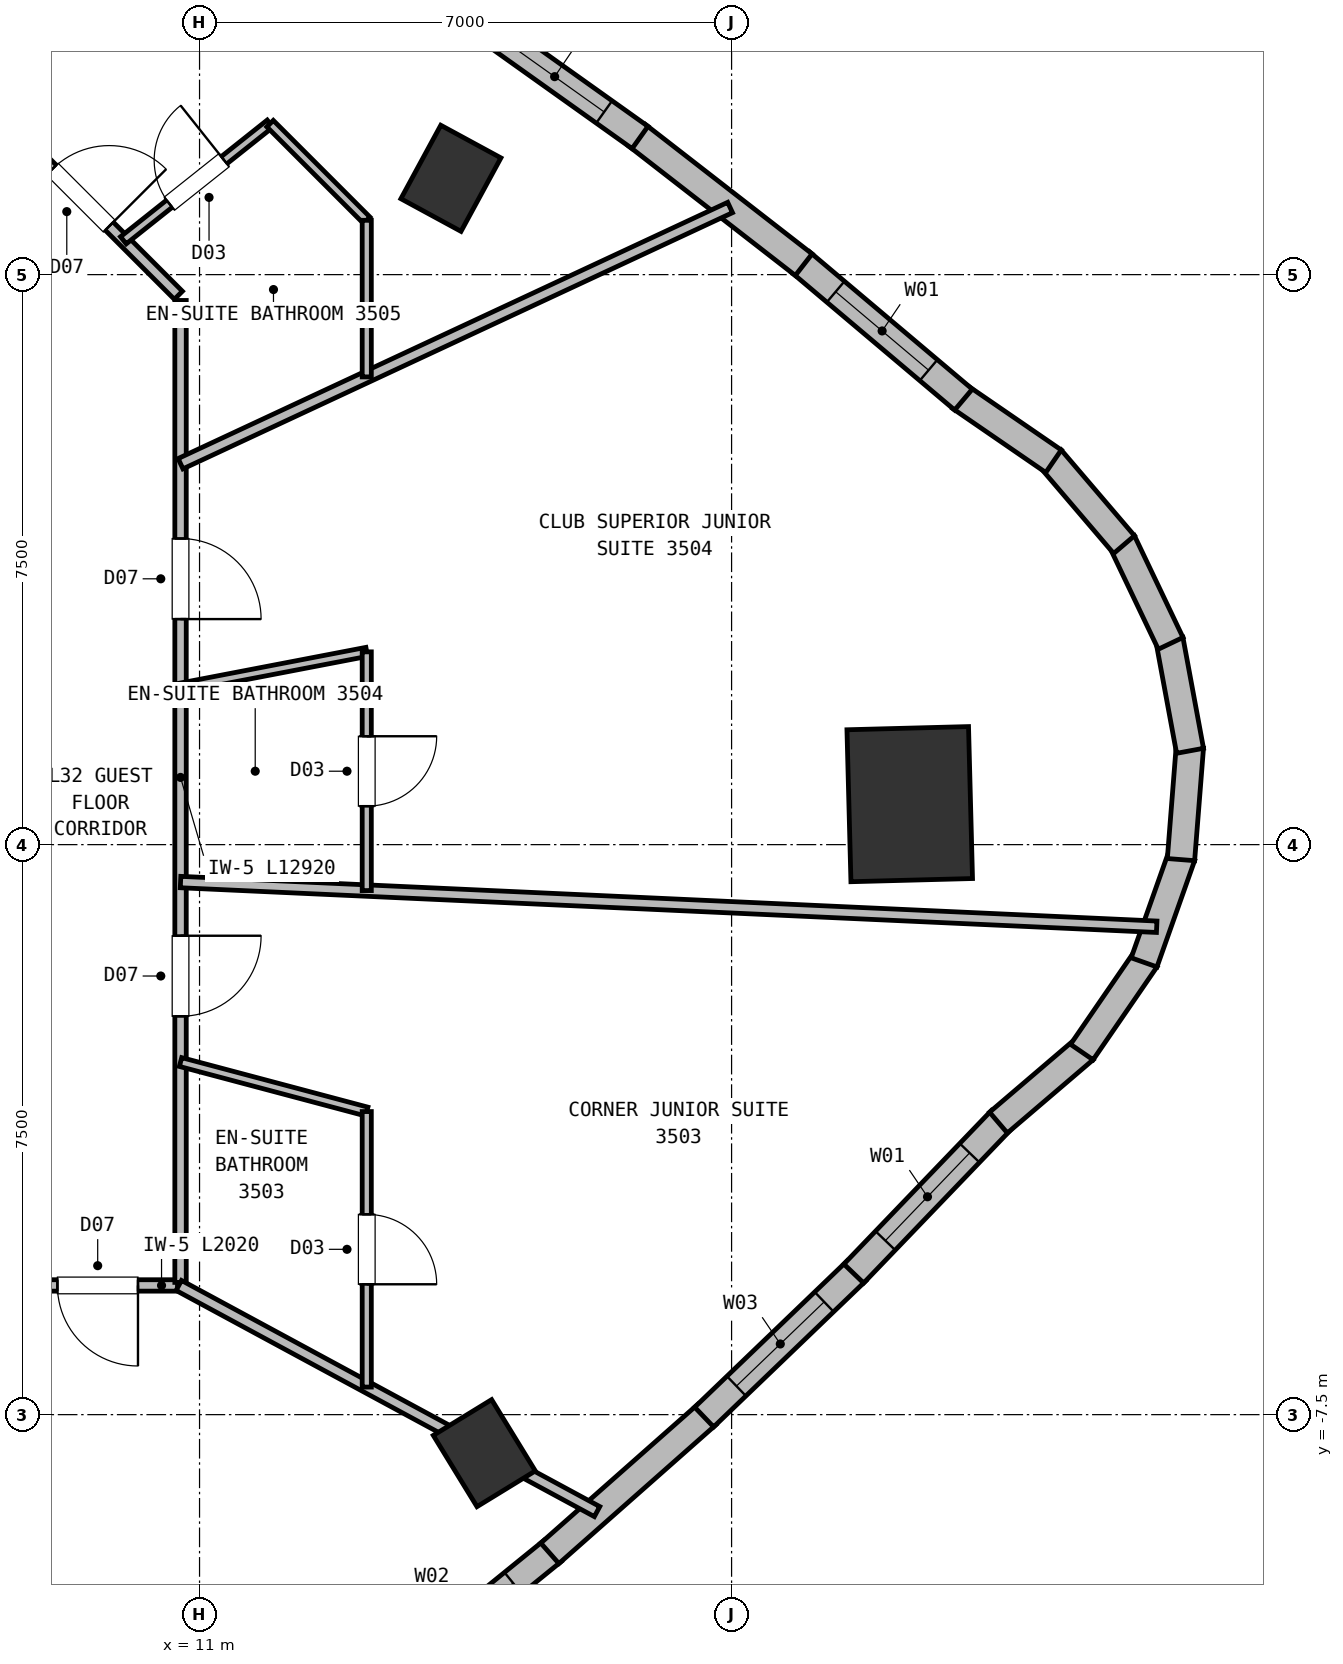
"""IFC4 building model, lengths in metres.
Left out: names, types, materials, properties, quantities, classifications, styles, units other than length and angle.
Written with IfcOpenShell. Run it as: python <this file> out.ifc"""

import sys

from ifc_helpers import new_model, si_unit, direction, frame, frame_2d, origin, origin_2d, place, context, subcontext, project, spatial, rectangle, extrude, element, fill, save


model = new_model("IFC4")
c1 = context("Model", 3, precision=1e-05, world=origin(), true_north=direction((0.0, 1.0)))
c2 = subcontext(c1, "Body", "Model", "MODEL_VIEW")
j1 = project(units=[si_unit("LENGTHUNIT", "METRE"), si_unit("PLANEANGLEUNIT", "RADIAN")], contexts=[c1])
p1 = place(None, origin())
s1 = spatial("IfcSite", under=j1, at=p1, CompositionType="ELEMENT")
p2 = place(p1, origin())
s2 = spatial("IfcBuilding", under=s1, at=p2, CompositionType="ELEMENT")
p3 = place(p2, frame((0.0, 0.0, 131.0)))
s3 = spatial("IfcBuildingStorey", under=s2, at=p3, CompositionType="ELEMENT", Elevation=131.0)
p4 = place(p3, frame((14.747, -8.007, 0.0), z_axis=(0.0, 0.0, 1.0), x_axis=(0.852640164354, 0.522498564716, 0.0)))
e1 = element("IfcColumn", 1, at=p4, inside=s3, PredefinedType="COLUMN", context=c2, shape_type="SweptSolid", body=[
    extrude(rectangle(XDim=0.9, YDim=1.1, at=origin_2d()), origin(), (0.0, 0.0, 1.0), 3.75),
])
p5 = place(p3, frame((20.344, 0.533, 0.0), z_axis=(0.0, 0.0, 1.0), x_axis=(0.999657324976, 0.026176948308, 0.0)))
e2 = element("IfcColumn", 2, at=p5, inside=s3, PredefinedType="COLUMN", context=c2, shape_type="SweptSolid", body=[
    extrude(rectangle(XDim=1.6, YDim=2.0, at=origin_2d()), origin(), (0.0, 0.0, 1.0), 3.75),
])
p6 = place(p3, frame((14.307, 8.767, 0.0), z_axis=(0.0, 0.0, 1.0), x_axis=(-0.878817112662, 0.47715876026, 0.0)))
e3 = element("IfcColumn", 3, at=p6, inside=s3, PredefinedType="COLUMN", context=c2, shape_type="SweptSolid", body=[
    extrude(rectangle(XDim=0.9, YDim=1.1, at=origin_2d()), origin(), (0.0, 0.0, 1.0), 3.75),
])
p7 = place(p3, frame((15.647, -9.292, 0.0), z_axis=(0.0, 0.0, 1.0), x_axis=(-0.776448630517, -0.630180548866, 0.0)))
e4 = element("IfcWall", 4, at=p7, inside=s3, PredefinedType="SOLIDWALL", context=c2, shape_type="SweptSolid", body=[
    extrude(rectangle(XDim=2.744, YDim=0.36, at=frame_2d((1.372, 0.0))), origin(), (0.0, 0.0, 1.0), 3.5),
])
p8 = place(p7, frame((0.672, 0.0, 0.72)))
e5 = element("IfcOpeningElement", 5, at=p8, cuts=e4, PredefinedType="OPENING", context=c2, shape_type="SweptSolid", body=[
    extrude(rectangle(XDim=1.4, YDim=1.84, at=frame_2d((0.7, 0.92))), frame((0.0, 0.19, 0.0), z_axis=(0.0, -1.0, 0.0), x_axis=(1.0, 0.0, 0.0)), (0.0, 0.0, 1.0), 0.38),
])
p9 = place(p3, frame((17.676, -7.498, 0.0), z_axis=(0.0, 0.0, 1.0), x_axis=(-0.749310700852, -0.662218599549, 0.0)))
e6 = element("IfcWall", 6, at=p9, inside=s3, PredefinedType="SOLIDWALL", context=c2, shape_type="SweptSolid", body=[
    extrude(rectangle(XDim=2.758, YDim=0.36, at=frame_2d((1.379, 0.0))), origin(), (0.0, 0.0, 1.0), 3.5),
])
p10 = place(p3, frame((19.643, -5.608, 0.0), z_axis=(0.0, 0.0, 1.0), x_axis=(-0.721375025509, -0.692544635797, 0.0)))
e7 = element("IfcWall", 7, at=p10, inside=s3, PredefinedType="SOLIDWALL", context=c2, shape_type="SweptSolid", body=[
    extrude(rectangle(XDim=2.778, YDim=0.36, at=frame_2d((1.389, 0.0))), origin(), (0.0, 0.0, 1.0), 3.5),
])
p11 = place(p10, frame((0.589, 0.0, 0.72)))
e8 = element("IfcOpeningElement", 8, at=p11, cuts=e7, PredefinedType="OPENING", context=c2, shape_type="SweptSolid", body=[
    extrude(rectangle(XDim=1.6, YDim=1.88, at=frame_2d((0.8, 0.94))), frame((0.0, 0.19, 0.0), z_axis=(0.0, -1.0, 0.0), x_axis=(1.0, 0.0, 0.0)), (0.0, 0.0, 1.0), 0.38),
])
p12 = place(p3, frame((21.548, -3.623, 0.0), z_axis=(0.0, 0.0, 1.0), x_axis=(-0.692624348053, -0.72129849056, 0.0)))
e9 = element("IfcWall", 9, at=p12, inside=s3, PredefinedType="SOLIDWALL", context=c2, shape_type="SweptSolid", body=[
    extrude(rectangle(XDim=2.801, YDim=0.36, at=frame_2d((1.401, 0.0))), origin(), (0.0, 0.0, 1.0), 3.5),
])
p13 = place(p12, frame((0.601, 0.0, 0.72)))
e10 = element("IfcOpeningElement", 10, at=p13, cuts=e9, PredefinedType="OPENING", context=c2, shape_type="SweptSolid", body=[
    extrude(rectangle(XDim=1.6, YDim=1.88, at=frame_2d((0.8, 0.94))), frame((0.0, 0.19, 0.0), z_axis=(0.0, -1.0, 0.0), x_axis=(1.0, 0.0, 0.0)), (0.0, 0.0, 1.0), 0.38),
])
p14 = place(p3, frame((22.641, -2.693, 0.0), z_axis=(0.0, 0.0, 1.0), x_axis=(-0.760392276745, -0.649464075578, 0.0)))
e11 = element("IfcWall", 11, at=p14, inside=s3, PredefinedType="SOLIDWALL", context=c2, shape_type="SweptSolid", body=[
    extrude(rectangle(XDim=1.486, YDim=0.36, at=frame_2d((0.743, 0.0))), origin(), (0.0, 0.0, 1.0), 3.5),
])
for number, where, z_axis, x_axis in (
    (12, (23.45, -1.505, 0.0), (0.0, 0.0, 1.0), (-0.566, -0.824, 0.0)),
    (13, (23.923, -0.148, 0.0), (0.0, 0.0, 1.0), (-0.334, -0.943, 0.0)),
):
    element("IfcWall", number, at=place(p3, frame(where, z_axis=z_axis, x_axis=x_axis)), inside=s3, PredefinedType="SOLIDWALL", context=c2, shape_type="SweptSolid", body=[
        extrude(rectangle(XDim=1.486, YDim=0.36, at=frame_2d((0.743, 0.0))), origin(), (0.0, 0.0, 1.0), 3.5),
    ])
for number, where, z_axis, x_axis in (
    (14, (24.029, 1.284, 0.0), (0.0, 0.0, 1.0), (-0.079, -0.997, 0.0)),
    (15, (23.761, 2.696, 0.0), (0.0, 0.0, 1.0), (0.182, -0.983, 0.0)),
    (16, (23.137, 3.99, 0.0), (0.0, 0.0, 1.0), (0.431, -0.903, 0.0)),
):
    element("IfcWall", number, at=place(p3, frame(where, z_axis=z_axis, x_axis=x_axis)), inside=s3, PredefinedType="SOLIDWALL", context=c2, shape_type="SweptSolid", body=[
        extrude(rectangle(XDim=1.486, YDim=0.36, at=frame_2d((0.743, 0.0))), origin(), (0.0, 0.0, 1.0), 3.5),
    ])
for number, where, z_axis, x_axis in (
    (17, (22.199, 5.078, 0.0), (0.0, 0.0, 1.0), (0.649, -0.76, 0.0)),
    (18, (21.011, 5.886, 0.0), (0.0, 0.0, 1.0), (0.824, -0.566, 0.0)),
):
    element("IfcWall", number, at=place(p3, frame(where, z_axis=z_axis, x_axis=x_axis)), inside=s3, PredefinedType="SOLIDWALL", context=c2, shape_type="SweptSolid", body=[
        extrude(rectangle(XDim=1.486, YDim=0.36, at=frame_2d((0.743, 0.0))), origin(), (0.0, 0.0, 1.0), 3.5),
    ])
p15 = place(p3, frame((18.91, 7.662, 0.0), z_axis=(0.0, 0.0, 1.0), x_axis=(0.764205561234, -0.644972759253, 0.0)))
e19 = element("IfcWall", 19, at=p15, inside=s3, PredefinedType="SOLIDWALL", context=c2, shape_type="SweptSolid", body=[
    extrude(rectangle(XDim=2.801, YDim=0.36, at=frame_2d((1.4, 0.0))), origin(), (0.0, 0.0, 1.0), 3.5),
])
p16 = place(p15, frame((0.601, 0.0, 0.72)))
e20 = element("IfcOpeningElement", 20, at=p16, cuts=e19, PredefinedType="OPENING", context=c2, shape_type="SweptSolid", body=[
    extrude(rectangle(XDim=1.6, YDim=1.88, at=frame_2d((0.8, 0.94))), frame((0.0, 0.19, 0.0), z_axis=(0.0, -1.0, 0.0), x_axis=(1.0, 0.0, 0.0)), (0.0, 0.0, 1.0), 0.38),
])
p17 = place(p3, frame((16.755, 9.334, 0.0), z_axis=(0.0, 0.0, 1.0), x_axis=(0.789792196605, -0.61337450728, 0.0)))
e21 = element("IfcWall", 21, at=p17, inside=s3, PredefinedType="SOLIDWALL", context=c2, shape_type="SweptSolid", body=[
    extrude(rectangle(XDim=2.777, YDim=0.36, at=frame_2d((1.389, 0.0))), origin(), (0.0, 0.0, 1.0), 3.5),
])
p18 = place(p3, frame((14.549, 10.905, 0.0), z_axis=(0.0, 0.0, 1.0), x_axis=(0.814510150839, -0.580149303352, 0.0)))
e22 = element("IfcWall", 22, at=p18, inside=s3, PredefinedType="SOLIDWALL", context=c2, shape_type="SweptSolid", body=[
    extrude(rectangle(XDim=2.759, YDim=0.36, at=frame_2d((1.379, 0.0))), origin(), (0.0, 0.0, 1.0), 3.5),
])
p19 = place(p18, frame((0.579, 0.0, 0.72)))
e23 = element("IfcOpeningElement", 23, at=p19, cuts=e22, PredefinedType="OPENING", context=c2, shape_type="SweptSolid", body=[
    extrude(rectangle(XDim=1.6, YDim=1.88, at=frame_2d((0.8, 0.94))), frame((0.0, 0.19, 0.0), z_axis=(0.0, -1.0, 0.0), x_axis=(1.0, 0.0, 0.0)), (0.0, 0.0, 1.0), 0.38),
])
p20 = place(p3, frame((10.71, -5.8, 0.0), z_axis=(0.0, 0.0, 1.0), x_axis=(-1.0, 0.0, 0.0)))
e24 = element("IfcWall", 24, at=p20, inside=s3, PredefinedType="PARTITIONING", context=c2, shape_type="SweptSolid", body=[
    extrude(rectangle(XDim=2.02, YDim=0.15, at=frame_2d((1.01, 0.0))), origin(), (0.0, 0.0, 1.0), 3.5),
])
p21 = place(p20, frame((0.52, 0.0, 0.0)))
e25 = element("IfcOpeningElement", 25, at=p21, cuts=e24, PredefinedType="OPENING", context=c2, shape_type="SweptSolid", body=[
    extrude(rectangle(XDim=1.06, YDim=2.15, at=frame_2d((0.53, 1.075))), frame((0.0, 0.085, 0.0), z_axis=(0.0, -1.0, 0.0), x_axis=(1.0, 0.0, 0.0)), (0.0, 0.0, 1.0), 0.17),
])
p22 = place(p3, frame((10.75, 7.16, 0.0), z_axis=(0.0, 0.0, 1.0), x_axis=(0.0, -1.0, 0.0)))
e26 = element("IfcWall", 26, at=p22, inside=s3, PredefinedType="PARTITIONING", context=c2, shape_type="SweptSolid", body=[
    extrude(rectangle(XDim=12.92, YDim=0.15, at=frame_2d((6.46, 0.0))), origin(), (0.0, 0.0, 1.0), 3.5),
])
p23 = place(p22, frame((8.359, 0.0, 0.0)))
e27 = element("IfcOpeningElement", 27, at=p23, cuts=e26, PredefinedType="OPENING", context=c2, shape_type="SweptSolid", body=[
    extrude(rectangle(XDim=1.06, YDim=2.15, at=frame_2d((0.53, 1.075))), frame((0.0, 0.085, 0.0), z_axis=(0.0, -1.0, 0.0), x_axis=(1.0, 0.0, 0.0)), (0.0, 0.0, 1.0), 0.17),
])
p24 = place(p22, frame((3.132, 0.0, 0.0)))
e28 = element("IfcOpeningElement", 28, at=p24, cuts=e26, PredefinedType="OPENING", context=c2, shape_type="SweptSolid", body=[
    extrude(rectangle(XDim=1.06, YDim=2.15, at=frame_2d((0.53, 1.075))), frame((0.0, 0.085, 0.0), z_axis=(0.0, -1.0, 0.0), x_axis=(1.0, 0.0, 0.0)), (0.0, 0.0, 1.0), 0.17),
])
p25 = place(p3, frame((8.678, 9.272, 0.0), z_axis=(0.0, 0.0, 1.0), x_axis=(0.707106781187, -0.707106781187, 0.0)))
e29 = element("IfcWall", 29, at=p25, inside=s3, PredefinedType="PARTITIONING", context=c2, shape_type="SweptSolid", body=[
    extrude(rectangle(XDim=2.89, YDim=0.15, at=frame_2d((1.445, 0.0))), origin(), (0.0, 0.0, 1.0), 3.5),
])
p26 = place(p25, frame((0.543, 0.0, 0.0)))
e30 = element("IfcOpeningElement", 30, at=p26, cuts=e29, PredefinedType="OPENING", context=c2, shape_type="SweptSolid", body=[
    extrude(rectangle(XDim=1.06, YDim=2.15, at=frame_2d((0.53, 1.075))), frame((0.0, 0.085, 0.0), z_axis=(0.0, -1.0, 0.0), x_axis=(1.0, 0.0, 0.0)), (0.0, 0.0, 1.0), 0.17),
])
p27 = place(p3, frame((10.727, -5.8, 0.0), z_axis=(0.0, 0.0, 1.0), x_axis=(0.879646503143, -0.475628036924, 0.0)))
e31 = element("IfcWall", 31, at=p27, inside=s3, PredefinedType="PARTITIONING", context=c2, shape_type="SweptSolid", body=[
    extrude(rectangle(XDim=6.256, YDim=0.15, at=frame_2d((3.128, 0.0))), origin(), (0.0, 0.0, 1.0), 2.98),
])
p28 = place(p3, frame((10.75, -2.86, 0.0), z_axis=(0.0, 0.0, 1.0), x_axis=(0.966378640851, -0.257123166026, 0.0)))
e32 = element("IfcWall", 32, at=p28, inside=s3, PredefinedType="PARTITIONING", context=c2, shape_type="SweptSolid", body=[
    extrude(rectangle(XDim=2.535, YDim=0.12, at=frame_2d((1.268, 0.0))), origin(), (0.0, 0.0, 1.0), 3.5),
])
p29 = place(p3, frame((13.2, -3.512, 0.0), z_axis=(0.0, 0.0, 1.0), x_axis=(0.0, -1.0, 0.0)))
e33 = element("IfcWall", 33, at=p29, inside=s3, PredefinedType="PARTITIONING", context=c2, shape_type="SweptSolid", body=[
    extrude(rectangle(XDim=3.625, YDim=0.12, at=frame_2d((1.812, 0.0))), origin(), (0.0, 0.0, 1.0), 3.5),
])
p30 = place(p29, frame((1.353, 0.0, 0.0)))
e34 = element("IfcOpeningElement", 34, at=p30, cuts=e33, PredefinedType="OPENING", context=c2, shape_type="SweptSolid", body=[
    extrude(rectangle(XDim=0.92, YDim=2.1, at=frame_2d((0.46, 1.05))), frame((0.0, 0.07, 0.0), z_axis=(0.0, -1.0, 0.0), x_axis=(1.0, 0.0, 0.0)), (0.0, 0.0, 1.0), 0.14),
])
p31 = place(p3, frame((10.75, -0.492, 0.0), z_axis=(0.0, 0.0, 1.0), x_axis=(0.998952227347, -0.045765133883, 0.0)))
e35 = element("IfcWall", 35, at=p31, inside=s3, PredefinedType="PARTITIONING", context=c2, shape_type="SweptSolid", body=[
    extrude(rectangle(XDim=12.856, YDim=0.15, at=frame_2d((6.428, 0.0))), origin(), (0.0, 0.0, 1.0), 3.5),
])
p32 = place(p3, frame((13.2, 2.537, 0.0), z_axis=(0.0, 0.0, 1.0), x_axis=(-0.982039238769, -0.188676796447, 0.0)))
e36 = element("IfcWall", 36, at=p32, inside=s3, PredefinedType="PARTITIONING", context=c2, shape_type="SweptSolid", body=[
    extrude(rectangle(XDim=2.495, YDim=0.12, at=frame_2d((1.248, 0.0))), origin(), (0.0, 0.0, 1.0), 3.5),
])
p33 = place(p3, frame((13.2, 2.537, 0.0), z_axis=(0.0, 0.0, 1.0), x_axis=(0.0, -1.0, 0.0)))
e37 = element("IfcWall", 37, at=p33, inside=s3, PredefinedType="PARTITIONING", context=c2, shape_type="SweptSolid", body=[
    extrude(rectangle(XDim=3.141, YDim=0.12, at=frame_2d((1.571, 0.0))), origin(), (0.0, 0.0, 1.0), 3.5),
])
p34 = place(p33, frame((1.111, 0.0, 0.0)))
e38 = element("IfcOpeningElement", 38, at=p34, cuts=e37, PredefinedType="OPENING", context=c2, shape_type="SweptSolid", body=[
    extrude(rectangle(XDim=0.92, YDim=2.1, at=frame_2d((0.46, 1.05))), frame((0.0, 0.07, 0.0), z_axis=(0.0, -1.0, 0.0), x_axis=(1.0, 0.0, 0.0)), (0.0, 0.0, 1.0), 0.14),
])
p35 = place(p3, frame((10.75, 5.012, 0.0), z_axis=(0.0, 0.0, 1.0), x_axis=(0.90633944919, 0.422550355393, 0.0)))
e39 = element("IfcWall", 39, at=p35, inside=s3, PredefinedType="PARTITIONING", context=c2, shape_type="SweptSolid", body=[
    extrude(rectangle(XDim=7.977, YDim=0.15, at=frame_2d((3.989, 0.0))), origin(), (0.0, 0.0, 1.0), 3.5),
])
p36 = place(p3, frame((9.998, 7.952, 0.0), z_axis=(0.0, 0.0, 1.0), x_axis=(0.782652575374, 0.622458790813, 0.0)))
e40 = element("IfcWall", 40, at=p36, inside=s3, PredefinedType="PARTITIONING", context=c2, shape_type="SweptSolid", body=[
    extrude(rectangle(XDim=2.466, YDim=0.12, at=frame_2d((1.233, 0.0))), origin(), (0.0, 0.0, 1.0), 3.5),
])
p37 = place(p36, frame((0.773, 0.0, 0.0)))
e41 = element("IfcOpeningElement", 41, at=p37, cuts=e40, PredefinedType="OPENING", context=c2, shape_type="SweptSolid", body=[
    extrude(rectangle(XDim=0.92, YDim=2.1, at=frame_2d((0.46, 1.05))), frame((0.0, 0.07, 0.0), z_axis=(0.0, -1.0, 0.0), x_axis=(1.0, 0.0, 0.0)), (0.0, 0.0, 1.0), 0.14),
])
p38 = place(p3, frame((11.928, 9.487, 0.0), z_axis=(0.0, 0.0, 1.0), x_axis=(0.707106781187, -0.707106781187, 0.0)))
e42 = element("IfcWall", 42, at=p38, inside=s3, PredefinedType="PARTITIONING", context=c2, shape_type="SweptSolid", body=[
    extrude(rectangle(XDim=1.799, YDim=0.12, at=frame_2d((0.899, 0.0))), origin(), (0.0, 0.0, 1.0), 3.5),
])
p39 = place(p3, frame((13.2, 6.154, 0.0), z_axis=(0.0, 0.0, 1.0), x_axis=(0.0, 1.0, 0.0)))
e43 = element("IfcWall", 43, at=p39, inside=s3, PredefinedType="PARTITIONING", context=c2, shape_type="SweptSolid", body=[
    extrude(rectangle(XDim=2.061, YDim=0.12, at=frame_2d((1.03, 0.0))), origin(), (0.0, 0.0, 1.0), 3.5),
])
p40 = place(p3, frame((7.04, 9.3, 0.0), z_axis=(0.0, 0.0, 1.0), x_axis=(0.603561778398, 0.797316235667, 0.0)))
e44 = element("IfcWall", 44, at=p40, inside=s3, PredefinedType="PARTITIONING", context=c2, shape_type="SweptSolid", body=[
    extrude(rectangle(XDim=5.354, YDim=0.15, at=frame_2d((2.677, 0.0))), origin(), (0.0, 0.0, 1.0), 3.5),
])
p41 = place(p8, origin())
e45 = element("IfcWindow", 45, at=p41, inside=s3, PartitioningType="SINGLE_PANEL", PredefinedType="WINDOW", context=c2, shape_type="SweptSolid", body=[
    extrude(rectangle(XDim=1.4, YDim=1.84, at=frame_2d((0.7, 0.92))), frame((0.0, 0.03, 0.0), z_axis=(0.0, -1.0, 0.0), x_axis=(1.0, 0.0, 0.0)), (0.0, 0.0, 1.0), 0.06),
])
fill(e5, e45)
p42 = place(p11, origin())
e46 = element("IfcWindow", 46, at=p42, inside=s3, PartitioningType="SINGLE_PANEL", PredefinedType="WINDOW", context=c2, shape_type="SweptSolid", body=[
    extrude(rectangle(XDim=1.6, YDim=1.88, at=frame_2d((0.8, 0.94))), frame((0.0, 0.03, 0.0), z_axis=(0.0, -1.0, 0.0), x_axis=(1.0, 0.0, 0.0)), (0.0, 0.0, 1.0), 0.06),
])
fill(e8, e46)
p43 = place(p13, origin())
e47 = element("IfcWindow", 47, at=p43, inside=s3, PartitioningType="SINGLE_PANEL", PredefinedType="WINDOW", context=c2, shape_type="SweptSolid", body=[
    extrude(rectangle(XDim=1.6, YDim=1.88, at=frame_2d((0.8, 0.94))), frame((0.0, 0.03, 0.0), z_axis=(0.0, -1.0, 0.0), x_axis=(1.0, 0.0, 0.0)), (0.0, 0.0, 1.0), 0.06),
])
fill(e10, e47)
p44 = place(p16, origin())
e48 = element("IfcWindow", 48, at=p44, inside=s3, PartitioningType="SINGLE_PANEL", PredefinedType="WINDOW", context=c2, shape_type="SweptSolid", body=[
    extrude(rectangle(XDim=1.6, YDim=1.88, at=frame_2d((0.8, 0.94))), frame((0.0, 0.03, 0.0), z_axis=(0.0, -1.0, 0.0), x_axis=(1.0, 0.0, 0.0)), (0.0, 0.0, 1.0), 0.06),
])
fill(e20, e48)
p45 = place(p19, origin())
e49 = element("IfcWindow", 49, at=p45, inside=s3, PartitioningType="SINGLE_PANEL", PredefinedType="WINDOW", context=c2, shape_type="SweptSolid", body=[
    extrude(rectangle(XDim=1.6, YDim=1.88, at=frame_2d((0.8, 0.94))), frame((0.0, 0.03, 0.0), z_axis=(0.0, -1.0, 0.0), x_axis=(1.0, 0.0, 0.0)), (0.0, 0.0, 1.0), 0.06),
])
fill(e23, e49)
p46 = place(p30, origin())
e50 = element("IfcDoor", 50, at=p46, inside=s3, OperationType="SINGLE_SWING_RIGHT", PredefinedType="DOOR", context=c2, shape_type="SweptSolid", body=[
    extrude(rectangle(XDim=0.92, YDim=2.1, at=frame_2d((0.46, 1.05))), frame((0.0, 0.025, 0.0), z_axis=(0.0, -1.0, 0.0), x_axis=(1.0, 0.0, 0.0)), (0.0, 0.0, 1.0), 0.05),
])
fill(e34, e50)
p47 = place(p34, origin())
e51 = element("IfcDoor", 51, at=p47, inside=s3, OperationType="SINGLE_SWING_LEFT", PredefinedType="DOOR", context=c2, shape_type="SweptSolid", body=[
    extrude(rectangle(XDim=0.92, YDim=2.1, at=frame_2d((0.46, 1.05))), frame((0.0, 0.025, 0.0), z_axis=(0.0, -1.0, 0.0), x_axis=(1.0, 0.0, 0.0)), (0.0, 0.0, 1.0), 0.05),
])
fill(e38, e51)
p48 = place(p37, origin())
e52 = element("IfcDoor", 52, at=p48, inside=s3, OperationType="SINGLE_SWING_RIGHT", PredefinedType="DOOR", context=c2, shape_type="SweptSolid", body=[
    extrude(rectangle(XDim=0.92, YDim=2.1, at=frame_2d((0.46, 1.05))), frame((0.0, 0.025, 0.0), z_axis=(0.0, -1.0, 0.0), x_axis=(1.0, 0.0, 0.0)), (0.0, 0.0, 1.0), 0.05),
])
fill(e41, e52)
p49 = place(p26, origin())
e53 = element("IfcDoor", 53, at=p49, inside=s3, OperationType="SINGLE_SWING_RIGHT", PredefinedType="DOOR", context=c2, shape_type="SweptSolid", body=[
    extrude(rectangle(XDim=1.06, YDim=2.15, at=frame_2d((0.53, 1.075))), frame((0.0, 0.025, 0.0), z_axis=(0.0, -1.0, 0.0), x_axis=(1.0, 0.0, 0.0)), (0.0, 0.0, 1.0), 0.05),
])
fill(e30, e53)
p50 = place(p23, origin())
e54 = element("IfcDoor", 54, at=p50, inside=s3, OperationType="SINGLE_SWING_LEFT", PredefinedType="DOOR", context=c2, shape_type="SweptSolid", body=[
    extrude(rectangle(XDim=1.06, YDim=2.15, at=frame_2d((0.53, 1.075))), frame((0.0, 0.025, 0.0), z_axis=(0.0, -1.0, 0.0), x_axis=(1.0, 0.0, 0.0)), (0.0, 0.0, 1.0), 0.05),
])
fill(e27, e54)
p51 = place(p24, origin())
e55 = element("IfcDoor", 55, at=p51, inside=s3, OperationType="SINGLE_SWING_RIGHT", PredefinedType="DOOR", context=c2, shape_type="SweptSolid", body=[
    extrude(rectangle(XDim=1.06, YDim=2.15, at=frame_2d((0.53, 1.075))), frame((0.0, 0.025, 0.0), z_axis=(0.0, -1.0, 0.0), x_axis=(1.0, 0.0, 0.0)), (0.0, 0.0, 1.0), 0.05),
])
fill(e28, e55)
p52 = place(p21, origin())
e56 = element("IfcDoor", 56, at=p52, inside=s3, OperationType="SINGLE_SWING_LEFT", PredefinedType="DOOR", context=c2, shape_type="SweptSolid", body=[
    extrude(rectangle(XDim=1.06, YDim=2.15, at=frame_2d((0.53, 1.075))), frame((0.0, 0.025, 0.0), z_axis=(0.0, -1.0, 0.0), x_axis=(1.0, 0.0, 0.0)), (0.0, 0.0, 1.0), 0.05),
])
fill(e25, e56)
save(model, sys.argv[1])
